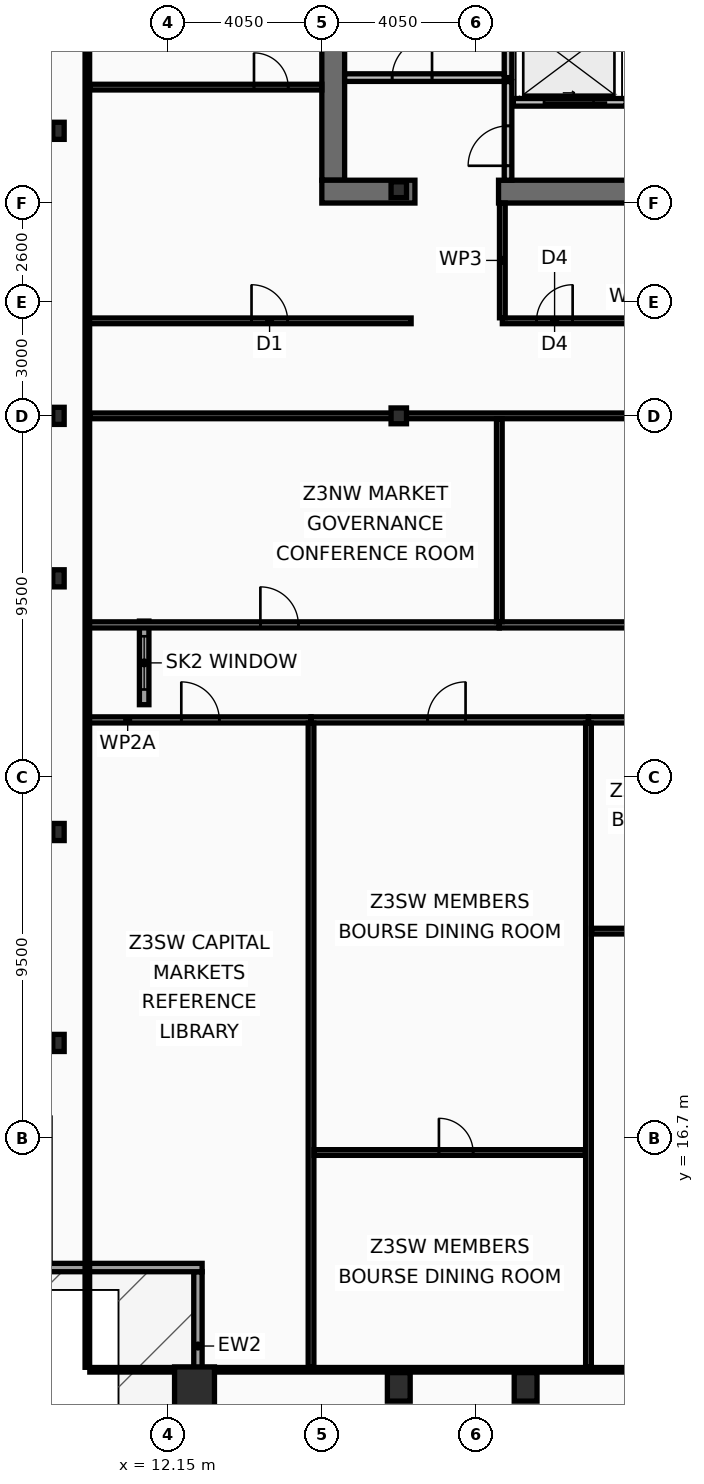
"""IFC4 building model, lengths in metres.
Left out: names, types, materials, properties, quantities, classifications, styles, units other than length and angle.
Written with IfcOpenShell. Run it as: python <this file> out.ifc"""

import sys

from ifc_helpers import new_model, si_unit, direction, frame, frame_2d, origin, origin_2d, place, context, subcontext, project, spatial, rectangle, hollow_rectangle, i_section, extrude, element, fill, save


model = new_model("IFC4")
c1 = context("Model", 3, precision=1e-05, world=origin(), true_north=direction((0.0, 1.0)))
c2 = subcontext(c1, "Body", "Model", "MODEL_VIEW")
j1 = project(units=[si_unit("LENGTHUNIT", "METRE"), si_unit("PLANEANGLEUNIT", "RADIAN")], contexts=[c1])
p1 = place(None, origin())
s1 = spatial("IfcSite", under=j1, at=p1, CompositionType="ELEMENT")
p2 = place(p1, origin())
s2 = spatial("IfcBuilding", under=s1, at=p2, CompositionType="ELEMENT")
p3 = place(p2, frame((0.0, 0.0, 239.0)))
s3 = spatial("IfcBuildingStorey", under=s2, at=p3, CompositionType="ELEMENT", Elevation=239.0)
p4 = place(p3, frame((16.5, 41.9, 0.0), z_axis=(0.0, 0.0, 1.0), x_axis=(0.0, 1.0, 0.0)))
e1 = element("IfcWall", 1, at=p4, inside=s3, PredefinedType="SHEAR", context=c2, shape_type="SweptSolid", body=[
    extrude(rectangle(XDim=11.2, YDim=0.6, at=frame_2d((5.6, 0.0))), origin(), (0.0, 0.0, 1.0), 3.44),
])
p5 = place(p3, frame((18.65, 41.6, 0.0), z_axis=(0.0, 0.0, 1.0), x_axis=(-1.0, 0.0, 0.0)))
e2 = element("IfcWall", 2, at=p5, inside=s3, PredefinedType="SHEAR", context=c2, shape_type="SweptSolid", body=[
    extrude(rectangle(XDim=2.45, YDim=0.6, at=frame_2d((1.225, 0.0))), origin(), (0.0, 0.0, 1.0), 3.44),
])
p6 = place(p3, frame((32.3, 41.6, 0.0), z_axis=(0.0, 0.0, 1.0), x_axis=(-1.0, 0.0, 0.0)))
e3 = element("IfcWall", 3, at=p6, inside=s3, PredefinedType="SHEAR", context=c2, shape_type="SweptSolid", body=[
    extrude(rectangle(XDim=11.45, YDim=0.6, at=frame_2d((5.725, 0.0))), origin(), (0.0, 0.0, 1.0), 3.44),
])
p7 = place(p3, frame((12.85, 10.15, 0.0), z_axis=(0.0, 0.0, 1.0), x_axis=(1.0, 0.0, 0.0)))
e4 = element("IfcColumn", 4, at=p7, inside=s3, PredefinedType="COLUMN", context=c2, shape_type="SweptSolid", body=[
    extrude(hollow_rectangle(XDim=1.05, YDim=1.05, WallThickness=0.055, at=origin_2d()), origin(), (0.0, 0.0, 1.0), 3.6),
])
for number, where, z_axis, x_axis in (
    (5, (18.225, 10.15, 0.0), (0.0, 0.0, 1.0), (1.0, 0.0, 0.0)),
    (6, (21.562, 10.15, 0.0), (0.0, 0.0, 1.0), (1.0, 0.0, 0.0)),
):
    element("IfcColumn", number, at=place(p3, frame(where, z_axis=z_axis, x_axis=x_axis)), inside=s3, PredefinedType="COLUMN", context=c2, shape_type="SweptSolid", body=[
        extrude(hollow_rectangle(XDim=0.6, YDim=0.75, WallThickness=0.045, at=origin_2d()), origin(), (0.0, 0.0, 1.0), 3.6),
    ])
for number, where, z_axis, x_axis in (
    (7, (9.27, 19.2, 0.0), (0.0, 0.0, 1.0), (1.0, 0.0, 0.0)),
    (8, (9.27, 24.75, 0.0), (0.0, 0.0, 1.0), (1.0, 0.0, 0.0)),
    (9, (9.27, 31.425, 0.0), (0.0, 0.0, 1.0), (1.0, 0.0, 0.0)),
    (10, (9.27, 35.7, 0.0), (0.0, 0.0, 1.0), (1.0, 0.0, 0.0)),
    (11, (9.27, 43.2, 0.0), (0.0, 0.0, 1.0), (1.0, 0.0, 0.0)),
):
    element("IfcColumn", number, at=place(p3, frame(where, z_axis=z_axis, x_axis=x_axis)), inside=s3, PredefinedType="COLUMN", context=c2, shape_type="SweptSolid", body=[
        extrude(i_section(OverallWidth=0.3, OverallDepth=0.45, WebThickness=0.014, FlangeThickness=0.026, at=origin_2d()), origin(), (0.0, 0.0, 1.0), 3.6),
    ])
for number, where, z_axis, x_axis in (
    (12, (18.225, 35.7, 0.0), (0.0, 0.0, 1.0), (1.0, 0.0, 0.0)),
    (13, (18.225, 41.65, 0.0), (0.0, 0.0, 1.0), (1.0, 0.0, 0.0)),
):
    element("IfcColumn", number, at=place(p3, frame(where, z_axis=z_axis, x_axis=x_axis)), inside=s3, PredefinedType="COLUMN", context=c2, shape_type="SweptSolid", body=[
        extrude(i_section(OverallWidth=0.406, OverallDepth=0.416, WebThickness=0.03, FlangeThickness=0.048, at=origin_2d()), origin(), (0.0, 0.0, 1.0), 3.6),
    ])
p8 = place(p3, frame((12.94, 9.27, 0.0), z_axis=(0.0, 0.0, 1.0), x_axis=(0.0, 1.0, 0.0)))
e14 = element("IfcWall", 14, at=p8, inside=s3, PredefinedType="SOLIDWALL", context=c2, shape_type="SweptSolid", body=[
    extrude(rectangle(XDim=3.91, YDim=0.22, at=frame_2d((1.955, 0.0))), origin(), (0.0, 0.0, 1.0), 2.83),
])
p9 = place(p3, frame((13.05, 13.29, 0.0), z_axis=(0.0, 0.0, 1.0), x_axis=(-1.0, 0.0, 0.0)))
e15 = element("IfcWall", 15, at=p9, inside=s3, PredefinedType="SOLIDWALL", context=c2, shape_type="SweptSolid", body=[
    extrude(rectangle(XDim=4.22, YDim=0.22, at=frame_2d((2.11, 0.0))), origin(), (0.0, 0.0, 1.0), 2.83),
])
p10 = place(p3, frame((11.525, 28.1, 0.0), z_axis=(0.0, 0.0, 1.0), x_axis=(0.0, 1.0, 0.0)))
e16 = element("IfcWall", 16, at=p10, inside=s3, PredefinedType="PARAPET", context=c2, shape_type="SweptSolid", body=[
    extrude(rectangle(XDim=2.2, YDim=0.25, at=frame_2d((1.1, 0.0))), origin(), (0.0, 0.0, 1.0), 0.88),
])
p11 = place(p10, frame((0.4, 0.0, 0.16)))
e17 = element("IfcOpeningElement", 17, at=p11, cuts=e16, PredefinedType="OPENING", context=c2, shape_type="SweptSolid", body=[
    extrude(rectangle(XDim=1.4, YDim=0.5, at=frame_2d((0.7, 0.25))), frame((0.0, 0.135, 0.0), z_axis=(0.0, -1.0, 0.0), x_axis=(1.0, 0.0, 0.0)), (0.0, 0.0, 1.0), 0.27),
])
p12 = place(p3, frame((24.21, 43.95, 0.0), z_axis=(0.0, 0.0, 1.0), x_axis=(-1.0, 0.0, 0.0)))
e18 = element("IfcWall", 18, at=p12, inside=s3, PredefinedType="PARTITIONING", context=c2, shape_type="SweptSolid", body=[
    extrude(rectangle(XDim=2.97, YDim=0.2, at=frame_2d((1.485, 0.0))), origin(), (0.0, 0.0, 1.0), 3.44),
])
p13 = place(p12, frame((0.86, 0.0, 0.0)))
e19 = element("IfcOpeningElement", 19, at=p13, cuts=e18, PredefinedType="OPENING", context=c2, shape_type="SweptSolid", body=[
    extrude(rectangle(XDim=1.3, YDim=2.18, at=frame_2d((0.65, 1.09))), frame((0.0, 0.11, 0.0), z_axis=(0.0, -1.0, 0.0), x_axis=(1.0, 0.0, 0.0)), (0.0, 0.0, 1.0), 0.22),
])
p14 = place(p3, frame((21.1, 44.6, 0.0), z_axis=(0.0, 0.0, 1.0), x_axis=(0.0, 1.0, 0.0)))
e20 = element("IfcWall", 20, at=p14, inside=s3, PredefinedType="PARTITIONING", context=c2, shape_type="SweptSolid", body=[
    extrude(rectangle(XDim=4.3, YDim=0.2, at=frame_2d((2.15, 0.0))), origin(), (0.0, 0.0, 1.0), 3.44),
])
p15 = place(p3, frame((16.8, 44.6, 0.0), z_axis=(0.0, 0.0, 1.0), x_axis=(1.0, 0.0, 0.0)))
e21 = element("IfcWall", 21, at=p15, inside=s3, PredefinedType="PARTITIONING", context=c2, shape_type="SweptSolid", body=[
    extrude(rectangle(XDim=4.2, YDim=0.2, at=frame_2d((2.1, 0.0))), origin(), (0.0, 0.0, 1.0), 3.44),
])
p16 = place(p15, frame((1.25, 0.0, 0.0)))
e22 = element("IfcOpeningElement", 22, at=p16, cuts=e21, PredefinedType="OPENING", context=c2, shape_type="SweptSolid", body=[
    extrude(rectangle(XDim=1.05, YDim=2.15, at=frame_2d((0.525, 1.075))), frame((0.0, 0.11, 0.0), z_axis=(0.0, -1.0, 0.0), x_axis=(1.0, 0.0, 0.0)), (0.0, 0.0, 1.0), 0.22),
])
p17 = place(p3, frame((21.1, 41.9, 0.0), z_axis=(0.0, 0.0, 1.0), x_axis=(0.0, 1.0, 0.0)))
e23 = element("IfcWall", 23, at=p17, inside=s3, PredefinedType="PARTITIONING", context=c2, shape_type="SweptSolid", body=[
    extrude(rectangle(XDim=2.595, YDim=0.2, at=frame_2d((1.298, 0.0))), origin(), (0.0, 0.0, 1.0), 3.44),
])
p18 = place(p17, frame((0.38, 0.0, 0.0)))
e24 = element("IfcOpeningElement", 24, at=p18, cuts=e23, PredefinedType="OPENING", context=c2, shape_type="SweptSolid", body=[
    extrude(rectangle(XDim=1.05, YDim=2.15, at=frame_2d((0.525, 1.075))), frame((0.0, 0.11, 0.0), z_axis=(0.0, -1.0, 0.0), x_axis=(1.0, 0.0, 0.0)), (0.0, 0.0, 1.0), 0.22),
])
p19 = place(p3, frame((20.95, 38.2, 0.0), z_axis=(0.0, 0.0, 1.0), x_axis=(1.0, 0.0, 0.0)))
e25 = element("IfcWall", 25, at=p19, inside=s3, PredefinedType="PARTITIONING", context=c2, shape_type="SweptSolid", body=[
    extrude(rectangle(XDim=4.55, YDim=0.15, at=frame_2d((2.275, 0.0))), origin(), (0.0, 0.0, 1.0), 2.78),
])
p20 = place(p19, frame((0.9, 0.0, 0.0)))
e26 = element("IfcOpeningElement", 26, at=p20, cuts=e25, PredefinedType="OPENING", context=c2, shape_type="SweptSolid", body=[
    extrude(rectangle(XDim=0.95, YDim=2.05, at=frame_2d((0.475, 1.025))), frame((0.0, 0.085, 0.0), z_axis=(0.0, -1.0, 0.0), x_axis=(1.0, 0.0, 0.0)), (0.0, 0.0, 1.0), 0.17),
])
p21 = place(p3, frame((20.95, 38.28, 0.0), z_axis=(0.0, 0.0, 1.0), x_axis=(0.0, 1.0, 0.0)))
e27 = element("IfcWall", 27, at=p21, inside=s3, PredefinedType="PARTITIONING", context=c2, shape_type="SweptSolid", body=[
    extrude(rectangle(XDim=3.02, YDim=0.15, at=frame_2d((1.51, 0.0))), origin(), (0.0, 0.0, 1.0), 3.44),
])
p22 = place(p3, frame((10.03, 38.2, 0.0), z_axis=(0.0, 0.0, 1.0), x_axis=(1.0, 0.0, 0.0)))
e28 = element("IfcWall", 28, at=p22, inside=s3, PredefinedType="PARTITIONING", context=c2, shape_type="SweptSolid", body=[
    extrude(rectangle(XDim=8.52, YDim=0.15, at=frame_2d((4.26, 0.0))), origin(), (0.0, 0.0, 1.0), 2.78),
])
p23 = place(p22, frame((4.32, 0.0, 0.0)))
e29 = element("IfcOpeningElement", 29, at=p23, cuts=e28, PredefinedType="OPENING", context=c2, shape_type="SweptSolid", body=[
    extrude(rectangle(XDim=0.95, YDim=2.05, at=frame_2d((0.475, 1.025))), frame((0.0, 0.085, 0.0), z_axis=(0.0, -1.0, 0.0), x_axis=(1.0, 0.0, 0.0)), (0.0, 0.0, 1.0), 0.17),
])
p24 = place(p3, frame((10.095, 44.35, 0.0), z_axis=(0.0, 0.0, 1.0), x_axis=(1.0, 0.0, 0.0)))
e30 = element("IfcWall", 30, at=p24, inside=s3, PredefinedType="PARTITIONING", context=c2, shape_type="SweptSolid", body=[
    extrude(rectangle(XDim=6.105, YDim=0.15, at=frame_2d((3.052, 0.0))), origin(), (0.0, 0.0, 1.0), 2.83),
])
p25 = place(p24, frame((4.32, 0.0, 0.0)))
e31 = element("IfcOpeningElement", 31, at=p25, cuts=e30, PredefinedType="OPENING", context=c2, shape_type="SweptSolid", body=[
    extrude(rectangle(XDim=0.9, YDim=2.05, at=frame_2d((0.45, 1.025))), frame((0.0, 0.085, 0.0), z_axis=(0.0, -1.0, 0.0), x_axis=(1.0, 0.0, 0.0)), (0.0, 0.0, 1.0), 0.17),
])
p26 = place(p3, frame((10.095, 35.7, 0.0), z_axis=(0.0, 0.0, 1.0), x_axis=(1.0, 0.0, 0.0)))
e32 = element("IfcWall", 32, at=p26, inside=s3, PredefinedType="PARTITIONING", context=c2, shape_type="SweptSolid", body=[
    extrude(rectangle(XDim=22.925, YDim=0.15, at=frame_2d((11.462, 0.0))), origin(), (0.0, 0.0, 1.0), 2.78),
])
p27 = place(p3, frame((10.03, 27.7, 0.0), z_axis=(0.0, 0.0, 1.0), x_axis=(1.0, 0.0, 0.0)))
e33 = element("IfcWall", 33, at=p27, inside=s3, PredefinedType="PARTITIONING", context=c2, shape_type="SweptSolid", body=[
    extrude(rectangle(XDim=5.886, YDim=0.16, at=frame_2d((2.943, 0.0))), origin(), (0.0, 0.0, 1.0), 3.44),
])
p28 = place(p27, frame((2.472, 0.0, 0.0)))
e34 = element("IfcOpeningElement", 34, at=p28, cuts=e33, PredefinedType="OPENING", context=c2, shape_type="SweptSolid", body=[
    extrude(rectangle(XDim=1.0, YDim=2.05, at=frame_2d((0.5, 1.025))), frame((0.0, 0.09, 0.0), z_axis=(0.0, -1.0, 0.0), x_axis=(1.0, 0.0, 0.0)), (0.0, 0.0, 1.0), 0.18),
])
p29 = place(p3, frame((15.916, 27.7, 0.0), z_axis=(0.0, 0.0, 1.0), x_axis=(1.0, 0.0, 0.0)))
e35 = element("IfcWall", 35, at=p29, inside=s3, PredefinedType="PARTITIONING", context=c2, shape_type="SweptSolid", body=[
    extrude(rectangle(XDim=7.301, YDim=0.16, at=frame_2d((3.65, 0.0))), origin(), (0.0, 0.0, 1.0), 2.78),
])
p30 = place(p29, frame((3.066, 0.0, 0.0)))
e36 = element("IfcOpeningElement", 36, at=p30, cuts=e35, PredefinedType="OPENING", context=c2, shape_type="SweptSolid", body=[
    extrude(rectangle(XDim=1.0, YDim=2.05, at=frame_2d((0.5, 1.025))), frame((0.0, 0.09, 0.0), z_axis=(0.0, -1.0, 0.0), x_axis=(1.0, 0.0, 0.0)), (0.0, 0.0, 1.0), 0.18),
])
p31 = place(p3, frame((15.916, 10.665, 0.0), z_axis=(0.0, 0.0, 1.0), x_axis=(0.0, 1.0, 0.0)))
e37 = element("IfcWall", 37, at=p31, inside=s3, PredefinedType="PARTITIONING", context=c2, shape_type="SweptSolid", body=[
    extrude(rectangle(XDim=16.95, YDim=0.15, at=frame_2d((8.475, 0.0))), origin(), (0.0, 0.0, 1.0), 2.78),
])
p32 = place(p3, frame((15.996, 16.317, 0.0), z_axis=(0.0, 0.0, 1.0), x_axis=(1.0, 0.0, 0.0)))
e38 = element("IfcWall", 38, at=p32, inside=s3, PredefinedType="PARTITIONING", context=c2, shape_type="SweptSolid", body=[
    extrude(rectangle(XDim=7.141, YDim=0.15, at=frame_2d((3.57, 0.0))), origin(), (0.0, 0.0, 1.0), 2.78),
])
p33 = place(p32, frame((3.285, 0.0, 0.0)))
e39 = element("IfcOpeningElement", 39, at=p33, cuts=e38, PredefinedType="OPENING", context=c2, shape_type="SweptSolid", body=[
    extrude(rectangle(XDim=0.9, YDim=2.05, at=frame_2d((0.45, 1.025))), frame((0.0, 0.085, 0.0), z_axis=(0.0, -1.0, 0.0), x_axis=(1.0, 0.0, 0.0)), (0.0, 0.0, 1.0), 0.17),
])
p34 = place(p3, frame((23.217, 27.7, 0.0), z_axis=(0.0, 0.0, 1.0), x_axis=(1.0, 0.0, 0.0)))
e40 = element("IfcWall", 40, at=p34, inside=s3, PredefinedType="PARTITIONING", context=c2, shape_type="SweptSolid", body=[
    extrude(rectangle(XDim=9.883, YDim=0.16, at=frame_2d((4.942, 0.0))), origin(), (0.0, 0.0, 1.0), 2.78),
])
p35 = place(p34, frame((4.151, 0.0, 0.0)))
e41 = element("IfcOpeningElement", 41, at=p35, cuts=e40, PredefinedType="OPENING", context=c2, shape_type="SweptSolid", body=[
    extrude(rectangle(XDim=1.0, YDim=2.05, at=frame_2d((0.5, 1.025))), frame((0.0, 0.09, 0.0), z_axis=(0.0, -1.0, 0.0), x_axis=(1.0, 0.0, 0.0)), (0.0, 0.0, 1.0), 0.18),
])
p36 = place(p3, frame((23.217, 10.665, 0.0), z_axis=(0.0, 0.0, 1.0), x_axis=(0.0, 1.0, 0.0)))
e42 = element("IfcWall", 42, at=p36, inside=s3, PredefinedType="PARTITIONING", context=c2, shape_type="SweptSolid", body=[
    extrude(rectangle(XDim=16.95, YDim=0.15, at=frame_2d((8.475, 0.0))), origin(), (0.0, 0.0, 1.0), 2.98),
])
p37 = place(p3, frame((23.297, 22.142, 0.0), z_axis=(0.0, 0.0, 1.0), x_axis=(1.0, 0.0, 0.0)))
e43 = element("IfcWall", 43, at=p37, inside=s3, PredefinedType="PARTITIONING", context=c2, shape_type="SweptSolid", body=[
    extrude(rectangle(XDim=9.723, YDim=0.15, at=frame_2d((4.862, 0.0))), origin(), (0.0, 0.0, 1.0), 2.78),
])
p38 = place(p37, frame((4.448, 0.0, 0.0)))
e44 = element("IfcOpeningElement", 44, at=p38, cuts=e43, PredefinedType="OPENING", context=c2, shape_type="SweptSolid", body=[
    extrude(rectangle(XDim=0.9, YDim=2.05, at=frame_2d((0.45, 1.025))), frame((0.0, 0.085, 0.0), z_axis=(0.0, -1.0, 0.0), x_axis=(1.0, 0.0, 0.0)), (0.0, 0.0, 1.0), 0.17),
])
p39 = place(p3, frame((10.03, 30.2, 0.0), z_axis=(0.0, 0.0, 1.0), x_axis=(1.0, 0.0, 0.0)))
e45 = element("IfcWall", 45, at=p39, inside=s3, PredefinedType="PARTITIONING", context=c2, shape_type="SweptSolid", body=[
    extrude(rectangle(XDim=10.841, YDim=0.16, at=frame_2d((5.42, 0.0))), origin(), (0.0, 0.0, 1.0), 2.78),
])
p40 = place(p39, frame((4.553, 0.0, 0.0)))
e46 = element("IfcOpeningElement", 46, at=p40, cuts=e45, PredefinedType="OPENING", context=c2, shape_type="SweptSolid", body=[
    extrude(rectangle(XDim=1.0, YDim=2.05, at=frame_2d((0.5, 1.025))), frame((0.0, 0.09, 0.0), z_axis=(0.0, -1.0, 0.0), x_axis=(1.0, 0.0, 0.0)), (0.0, 0.0, 1.0), 0.18),
])
p41 = place(p3, frame((20.871, 30.2, 0.0), z_axis=(0.0, 0.0, 1.0), x_axis=(1.0, 0.0, 0.0)))
e47 = element("IfcWall", 47, at=p41, inside=s3, PredefinedType="PARTITIONING", context=c2, shape_type="SweptSolid", body=[
    extrude(rectangle(XDim=12.229, YDim=0.16, at=frame_2d((6.115, 0.0))), origin(), (0.0, 0.0, 1.0), 2.78),
])
p42 = place(p41, frame((5.136, 0.0, 0.0)))
e48 = element("IfcOpeningElement", 48, at=p42, cuts=e47, PredefinedType="OPENING", context=c2, shape_type="SweptSolid", body=[
    extrude(rectangle(XDim=1.0, YDim=2.05, at=frame_2d((0.5, 1.025))), frame((0.0, 0.09, 0.0), z_axis=(0.0, -1.0, 0.0), x_axis=(1.0, 0.0, 0.0)), (0.0, 0.0, 1.0), 0.18),
])
p43 = place(p3, frame((20.871, 30.285, 0.0), z_axis=(0.0, 0.0, 1.0), x_axis=(0.0, 1.0, 0.0)))
e49 = element("IfcWall", 49, at=p43, inside=s3, PredefinedType="PARTITIONING", context=c2, shape_type="SweptSolid", body=[
    extrude(rectangle(XDim=5.335, YDim=0.15, at=frame_2d((2.667, 0.0))), origin(), (0.0, 0.0, 1.0), 2.98),
])
p44 = place(p3, frame((10.03, 10.665, 0.0), z_axis=(0.0, 0.0, 1.0), x_axis=(0.0, 1.0, 0.0)))
e50 = element("IfcWall", 50, at=p44, inside=s3, PredefinedType="PARTITIONING", context=c2, shape_type="SweptSolid", body=[
    extrude(rectangle(XDim=42.11, YDim=0.12, at=frame_2d((21.055, 0.0))), origin(), (0.0, 0.0, 1.0), 2.78),
])
p45 = place(p3, frame((10.095, 10.6, 0.0), z_axis=(0.0, 0.0, 1.0), x_axis=(1.0, 0.0, 0.0)))
e51 = element("IfcWall", 51, at=p45, inside=s3, PredefinedType="PARTITIONING", context=c2, shape_type="SweptSolid", body=[
    extrude(rectangle(XDim=52.71, YDim=0.12, at=frame_2d((26.355, 0.0))), origin(), (0.0, 0.0, 1.0), 2.78),
])
p46 = place(p11, origin())
e52 = element("IfcWindow", 52, at=p46, inside=s3, PartitioningType="SINGLE_PANEL", PredefinedType="SKYLIGHT", context=c2, shape_type="SweptSolid", body=[
    extrude(rectangle(XDim=1.4, YDim=0.5, at=frame_2d((0.7, 0.25))), frame((0.0, 0.03, 0.0), z_axis=(0.0, -1.0, 0.0), x_axis=(1.0, 0.0, 0.0)), (0.0, 0.0, 1.0), 0.06),
])
fill(e17, e52)
p47 = place(p13, origin())
e53 = element("IfcDoor", 53, at=p47, inside=s3, OperationType="SLIDING_TO_LEFT", PredefinedType="DOOR", context=c2, shape_type="SweptSolid", body=[
    extrude(rectangle(XDim=1.3, YDim=2.18, at=frame_2d((0.65, 1.09))), frame((0.0, 0.025, 0.0), z_axis=(0.0, -1.0, 0.0), x_axis=(1.0, 0.0, 0.0)), (0.0, 0.0, 1.0), 0.05),
])
fill(e19, e53)
p48 = place(p16, origin())
e54 = element("IfcDoor", 54, at=p48, inside=s3, OperationType="SINGLE_SWING_RIGHT", PredefinedType="DOOR", context=c2, shape_type="SweptSolid", body=[
    extrude(rectangle(XDim=1.05, YDim=2.15, at=frame_2d((0.525, 1.075))), frame((0.0, 0.025, 0.0), z_axis=(0.0, -1.0, 0.0), x_axis=(1.0, 0.0, 0.0)), (0.0, 0.0, 1.0), 0.05),
])
fill(e22, e54)
p49 = place(p18, origin())
e55 = element("IfcDoor", 55, at=p49, inside=s3, OperationType="SINGLE_SWING_LEFT", PredefinedType="DOOR", context=c2, shape_type="SweptSolid", body=[
    extrude(rectangle(XDim=1.05, YDim=2.15, at=frame_2d((0.525, 1.075))), frame((0.0, 0.025, 0.0), z_axis=(0.0, -1.0, 0.0), x_axis=(1.0, 0.0, 0.0)), (0.0, 0.0, 1.0), 0.05),
])
fill(e24, e55)
p50 = place(p20, origin())
e56 = element("IfcDoor", 56, at=p50, inside=s3, OperationType="SINGLE_SWING_RIGHT", PredefinedType="DOOR", context=c2, shape_type="SweptSolid", body=[
    extrude(rectangle(XDim=0.95, YDim=2.05, at=frame_2d((0.475, 1.025))), frame((0.0, 0.025, 0.0), z_axis=(0.0, -1.0, 0.0), x_axis=(1.0, 0.0, 0.0)), (0.0, 0.0, 1.0), 0.05),
])
fill(e26, e56)
p51 = place(p23, origin())
e57 = element("IfcDoor", 57, at=p51, inside=s3, OperationType="SINGLE_SWING_LEFT", PredefinedType="DOOR", context=c2, shape_type="SweptSolid", body=[
    extrude(rectangle(XDim=0.95, YDim=2.05, at=frame_2d((0.475, 1.025))), frame((0.0, 0.025, 0.0), z_axis=(0.0, -1.0, 0.0), x_axis=(1.0, 0.0, 0.0)), (0.0, 0.0, 1.0), 0.05),
])
fill(e29, e57)
p52 = place(p25, origin())
e58 = element("IfcDoor", 58, at=p52, inside=s3, OperationType="SINGLE_SWING_LEFT", PredefinedType="DOOR", context=c2, shape_type="SweptSolid", body=[
    extrude(rectangle(XDim=0.9, YDim=2.05, at=frame_2d((0.45, 1.025))), frame((0.0, 0.025, 0.0), z_axis=(0.0, -1.0, 0.0), x_axis=(1.0, 0.0, 0.0)), (0.0, 0.0, 1.0), 0.05),
])
fill(e31, e58)
p53 = place(p28, origin())
e59 = element("IfcDoor", 59, at=p53, inside=s3, OperationType="SINGLE_SWING_LEFT", PredefinedType="DOOR", context=c2, shape_type="SweptSolid", body=[
    extrude(rectangle(XDim=1.0, YDim=2.05, at=frame_2d((0.5, 1.025))), frame((0.0, 0.025, 0.0), z_axis=(0.0, -1.0, 0.0), x_axis=(1.0, 0.0, 0.0)), (0.0, 0.0, 1.0), 0.05),
])
fill(e34, e59)
p54 = place(p30, origin())
e60 = element("IfcDoor", 60, at=p54, inside=s3, OperationType="SINGLE_SWING_RIGHT", PredefinedType="DOOR", context=c2, shape_type="SweptSolid", body=[
    extrude(rectangle(XDim=1.0, YDim=2.05, at=frame_2d((0.5, 1.025))), frame((0.0, 0.025, 0.0), z_axis=(0.0, -1.0, 0.0), x_axis=(1.0, 0.0, 0.0)), (0.0, 0.0, 1.0), 0.05),
])
fill(e36, e60)
p55 = place(p33, origin())
e61 = element("IfcDoor", 61, at=p55, inside=s3, OperationType="SINGLE_SWING_LEFT", PredefinedType="DOOR", context=c2, shape_type="SweptSolid", body=[
    extrude(rectangle(XDim=0.9, YDim=2.05, at=frame_2d((0.45, 1.025))), frame((0.0, 0.025, 0.0), z_axis=(0.0, -1.0, 0.0), x_axis=(1.0, 0.0, 0.0)), (0.0, 0.0, 1.0), 0.05),
])
fill(e39, e61)
p56 = place(p40, origin())
e62 = element("IfcDoor", 62, at=p56, inside=s3, OperationType="SINGLE_SWING_LEFT", PredefinedType="DOOR", context=c2, shape_type="SweptSolid", body=[
    extrude(rectangle(XDim=1.0, YDim=2.05, at=frame_2d((0.5, 1.025))), frame((0.0, 0.025, 0.0), z_axis=(0.0, -1.0, 0.0), x_axis=(1.0, 0.0, 0.0)), (0.0, 0.0, 1.0), 0.05),
])
fill(e46, e62)
save(model, sys.argv[1])
